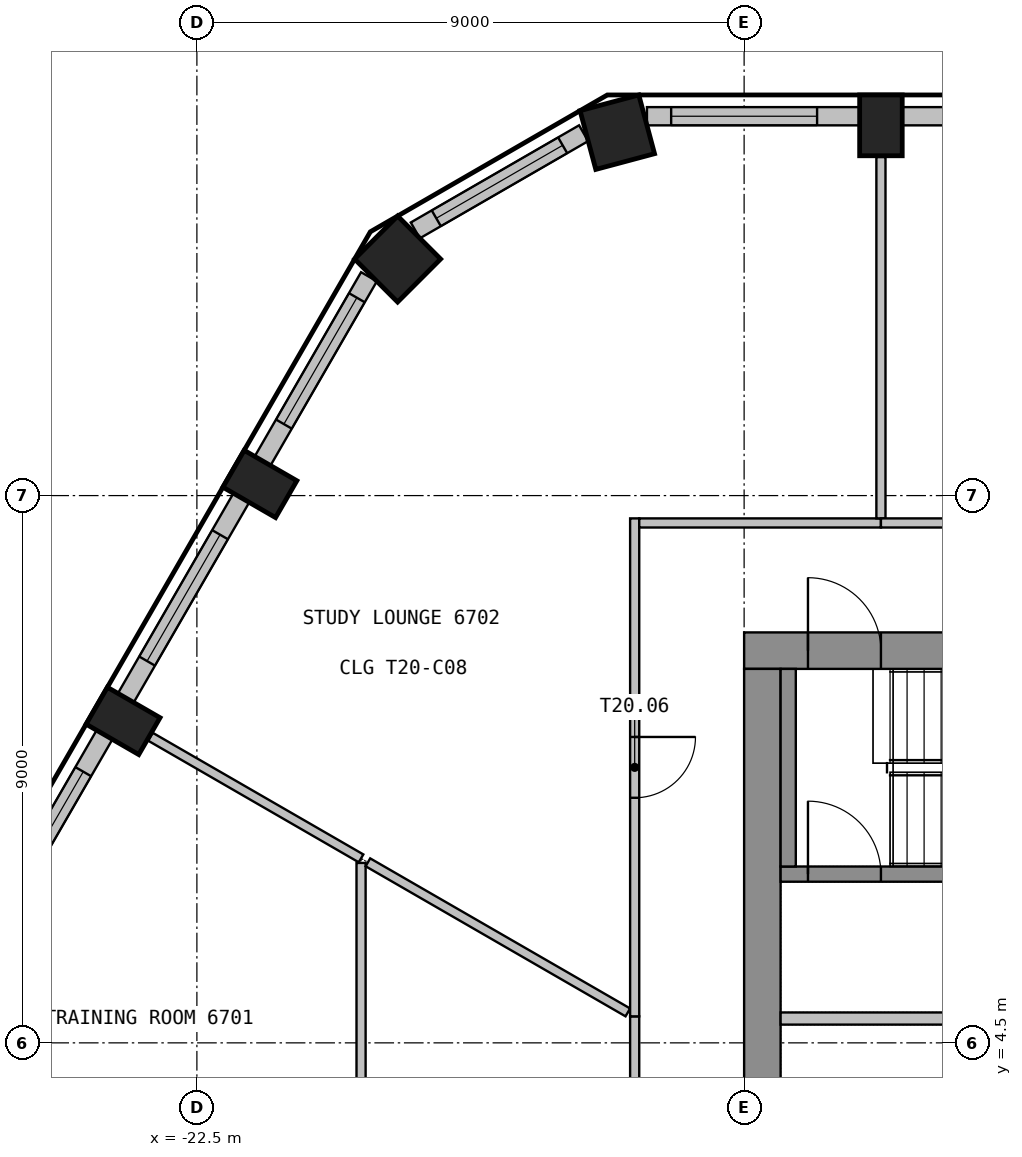
"""IFC4 building model, lengths in metres.
Left out: names, types, materials, properties, quantities, classifications, styles, units other than length and angle.
Written with IfcOpenShell. Run it as: python <this file> out.ifc"""

import sys

from ifc_helpers import new_model, si_unit, direction, frame, frame_2d, origin, origin_2d, place, context, subcontext, project, spatial, rectangle, extrude, element, fill, save


model = new_model("IFC4")
c1 = context("Model", 3, precision=1e-05, world=origin(), true_north=direction((0.0, 1.0)))
c2 = subcontext(c1, "Body", "Model", "MODEL_VIEW")
j1 = project(units=[si_unit("LENGTHUNIT", "METRE"), si_unit("PLANEANGLEUNIT", "RADIAN")], contexts=[c1])
p1 = place(None, origin())
s1 = spatial("IfcSite", under=j1, at=p1, CompositionType="ELEMENT")
p2 = place(p1, origin())
s2 = spatial("IfcBuilding", under=s1, at=p2, CompositionType="ELEMENT")
p3 = place(p2, frame((0.0, 0.0, 270.3)))
s3 = spatial("IfcBuildingStorey", under=s2, at=p3, CompositionType="ELEMENT", Elevation=270.3)
p4 = place(p3, frame((-11.25, 19.588, 0.0), z_axis=(0.0, 0.0, 1.0), x_axis=(-1.0, 0.0, 0.0)))
e1 = element("IfcColumn", 1, at=p4, inside=s3, PredefinedType="COLUMN", context=c2, shape_type="SweptSolid", body=[
    extrude(rectangle(XDim=0.7, YDim=1.0, at=origin_2d()), origin(), (0.0, 0.0, 1.0), 3.575),
])
for number, where, z_axis, x_axis in (
    (2, (-15.586, 19.476, 0.0), (0.0, 0.0, 1.0), (-0.966, -0.259, 0.0)),
    (3, (-19.199, 17.39, 0.0), (0.0, 0.0, 1.0), (-0.707, -0.707, 0.0)),
):
    element("IfcColumn", number, at=place(p3, frame(where, z_axis=z_axis, x_axis=x_axis)), inside=s3, PredefinedType="COLUMN", context=c2, shape_type="SweptSolid", body=[
        extrude(rectangle(XDim=1.0, YDim=1.0, at=origin_2d()), origin(), (0.0, 0.0, 1.0), 3.575),
    ])
for number, where, z_axis, x_axis in (
    (4, (-21.464, 13.691, 0.0), (0.0, 0.0, 1.0), (-0.5, -0.866, 0.0)),
    (5, (-23.714, 9.794, 0.0), (0.0, 0.0, 1.0), (-0.5, -0.866, 0.0)),
):
    element("IfcColumn", number, at=place(p3, frame(where, z_axis=z_axis, x_axis=x_axis)), inside=s3, PredefinedType="COLUMN", context=c2, shape_type="SweptSolid", body=[
        extrude(rectangle(XDim=0.7, YDim=1.0, at=origin_2d()), origin(), (0.0, 0.0, 1.0), 3.575),
    ])
p5 = place(p3, frame((-7.101, 19.739, 0.0), z_axis=(0.0, 0.0, 1.0), x_axis=(-1.0, 0.0, 0.0)))
e6 = element("IfcWall", 6, at=p5, inside=s3, PredefinedType="SOLIDWALL", context=c2, shape_type="SweptSolid", body=[
    extrude(rectangle(XDim=3.799, YDim=0.3, at=frame_2d((1.899, 0.0))), origin(), (0.0, 0.0, 1.0), 3.575),
])
p6 = place(p5, frame((0.699, 0.0, 0.9)))
e7 = element("IfcOpeningElement", 7, at=p6, cuts=e6, PredefinedType="OPENING", context=c2, shape_type="SweptSolid", body=[
    extrude(rectangle(XDim=2.4, YDim=2.1, at=frame_2d((1.2, 1.05))), frame((0.0, 0.16, 0.0), z_axis=(0.0, -1.0, 0.0), x_axis=(1.0, 0.0, 0.0)), (0.0, 0.0, 1.0), 0.32),
])
p7 = place(p3, frame((-11.601, 19.739, 0.0), z_axis=(0.0, 0.0, 1.0), x_axis=(-1.0, 0.0, 0.0)))
e8 = element("IfcWall", 8, at=p7, inside=s3, PredefinedType="SOLIDWALL", context=c2, shape_type="SweptSolid", body=[
    extrude(rectangle(XDim=3.498, YDim=0.3, at=frame_2d((1.749, 0.0))), origin(), (0.0, 0.0, 1.0), 3.575),
])
p8 = place(p7, frame((0.699, 0.0, 0.9)))
e9 = element("IfcOpeningElement", 9, at=p8, cuts=e8, PredefinedType="OPENING", context=c2, shape_type="SweptSolid", body=[
    extrude(rectangle(XDim=2.4, YDim=2.1, at=frame_2d((1.2, 1.05))), frame((0.0, 0.16, 0.0), z_axis=(0.0, -1.0, 0.0), x_axis=(1.0, 0.0, 0.0)), (0.0, 0.0, 1.0), 0.32),
])
p9 = place(p3, frame((-16.14, 19.459, 0.0), z_axis=(0.0, 0.0, 1.0), x_axis=(-0.866025316205, -0.500000151692, 0.0)))
e10 = element("IfcWall", 10, at=p9, inside=s3, PredefinedType="SOLIDWALL", context=c2, shape_type="SweptSolid", body=[
    extrude(rectangle(XDim=3.196, YDim=0.3, at=frame_2d((1.598, 0.0))), origin(), (0.0, 0.0, 1.0), 3.575),
])
p10 = place(p9, frame((0.398, 0.0, 0.9)))
e11 = element("IfcOpeningElement", 11, at=p10, cuts=e10, PredefinedType="OPENING", context=c2, shape_type="SweptSolid", body=[
    extrude(rectangle(XDim=2.4, YDim=2.1, at=frame_2d((1.2, 1.05))), frame((0.0, 0.16, 0.0), z_axis=(0.0, -1.0, 0.0), x_axis=(1.0, 0.0, 0.0)), (0.0, 0.0, 1.0), 0.32),
])
p11 = place(p3, frame((-19.67, 17.099, 0.0), z_axis=(0.0, 0.0, 1.0), x_axis=(-0.499960102815, -0.866048437209, 0.0)))
e12 = element("IfcWall", 12, at=p11, inside=s3, PredefinedType="SOLIDWALL", context=c2, shape_type="SweptSolid", body=[
    extrude(rectangle(XDim=3.498, YDim=0.3, at=frame_2d((1.749, 0.0))), origin(), (0.0, 0.0, 1.0), 3.575),
])
p12 = place(p11, frame((0.398, 0.0, 0.9)))
e13 = element("IfcOpeningElement", 13, at=p12, cuts=e12, PredefinedType="OPENING", context=c2, shape_type="SweptSolid", body=[
    extrude(rectangle(XDim=2.4, YDim=2.1, at=frame_2d((1.2, 1.05))), frame((0.0, 0.16, 0.0), z_axis=(0.0, -1.0, 0.0), x_axis=(1.0, 0.0, 0.0)), (0.0, 0.0, 1.0), 0.32),
])
p13 = place(p3, frame((-21.769, 13.463, 0.0), z_axis=(0.0, 0.0, 1.0), x_axis=(-0.499982058975, -0.866035761792, 0.0)))
e14 = element("IfcWall", 14, at=p13, inside=s3, PredefinedType="SOLIDWALL", context=c2, shape_type="SweptSolid", body=[
    extrude(rectangle(XDim=3.799, YDim=0.3, at=frame_2d((1.899, 0.0))), origin(), (0.0, 0.0, 1.0), 3.575),
])
p14 = place(p13, frame((0.699, 0.0, 0.9)))
e15 = element("IfcOpeningElement", 15, at=p14, cuts=e14, PredefinedType="OPENING", context=c2, shape_type="SweptSolid", body=[
    extrude(rectangle(XDim=2.4, YDim=2.1, at=frame_2d((1.2, 1.05))), frame((0.0, 0.16, 0.0), z_axis=(0.0, -1.0, 0.0), x_axis=(1.0, 0.0, 0.0)), (0.0, 0.0, 1.0), 0.32),
])
p15 = place(p3, frame((-24.019, 9.566, 0.0), z_axis=(0.0, 0.0, 1.0), x_axis=(-0.499982058975, -0.866035761792, 0.0)))
e16 = element("IfcWall", 16, at=p15, inside=s3, PredefinedType="SOLIDWALL", context=c2, shape_type="SweptSolid", body=[
    extrude(rectangle(XDim=3.799, YDim=0.3, at=frame_2d((1.899, 0.0))), origin(), (0.0, 0.0, 1.0), 3.575),
])
p16 = place(p15, frame((0.699, 0.0, 0.9)))
e17 = element("IfcOpeningElement", 17, at=p16, cuts=e16, PredefinedType="OPENING", context=c2, shape_type="SweptSolid", body=[
    extrude(rectangle(XDim=2.4, YDim=2.1, at=frame_2d((1.2, 1.05))), frame((0.0, 0.16, 0.0), z_axis=(0.0, -1.0, 0.0), x_axis=(1.0, 0.0, 0.0)), (0.0, 0.0, 1.0), 0.32),
])
p17 = place(p3, frame((-13.5, 10.95, 0.0), z_axis=(0.0, 0.0, 1.0), x_axis=(1.0, 0.0, 0.0)))
e18 = element("IfcWall", 18, at=p17, inside=s3, PredefinedType="SHEAR", context=c2, shape_type="SweptSolid", body=[
    extrude(rectangle(XDim=27.0, YDim=0.6, at=frame_2d((13.5, 0.0))), origin(), (0.0, 0.0, 1.0), 3.575),
])
p18 = place(p17, frame((12.3, 0.0, 0.0)))
e19 = element("IfcOpeningElement", 19, at=p18, cuts=e18, PredefinedType="OPENING", context=c2, shape_type="SweptSolid", body=[
    extrude(rectangle(XDim=2.4, YDim=2.1, at=frame_2d((1.2, 1.05))), frame((0.0, 0.31, 0.0), z_axis=(0.0, -1.0, 0.0), x_axis=(1.0, 0.0, 0.0)), (0.0, 0.0, 1.0), 0.62),
])
p19 = place(p17, frame((1.05, 0.0, 0.0)))
e20 = element("IfcOpeningElement", 20, at=p19, cuts=e18, PredefinedType="OPENING", context=c2, shape_type="SweptSolid", body=[
    extrude(rectangle(XDim=1.2, YDim=2.1, at=frame_2d((0.6, 1.05))), frame((0.0, 0.31, 0.0), z_axis=(0.0, -1.0, 0.0), x_axis=(1.0, 0.0, 0.0)), (0.0, 0.0, 1.0), 0.62),
])
p20 = place(p17, frame((24.75, 0.0, 0.0)))
e21 = element("IfcOpeningElement", 21, at=p20, cuts=e18, PredefinedType="OPENING", context=c2, shape_type="SweptSolid", body=[
    extrude(rectangle(XDim=1.2, YDim=2.1, at=frame_2d((0.6, 1.05))), frame((0.0, 0.31, 0.0), z_axis=(0.0, -1.0, 0.0), x_axis=(1.0, 0.0, 0.0)), (0.0, 0.0, 1.0), 0.62),
])
p21 = place(p3, frame((-13.2, -10.65, 0.0), z_axis=(0.0, 0.0, 1.0), x_axis=(0.0, 1.0, 0.0)))
e22 = element("IfcWall", 22, at=p21, inside=s3, PredefinedType="SHEAR", context=c2, shape_type="SweptSolid", body=[
    extrude(rectangle(XDim=21.3, YDim=0.6, at=frame_2d((10.65, 0.0))), origin(), (0.0, 0.0, 1.0), 3.575),
])
p22 = place(p21, frame((9.45, 0.0, 0.0)))
e23 = element("IfcOpeningElement", 23, at=p22, cuts=e22, PredefinedType="OPENING", context=c2, shape_type="SweptSolid", body=[
    extrude(rectangle(XDim=2.4, YDim=2.1, at=frame_2d((1.2, 1.05))), frame((0.0, 0.31, 0.0), z_axis=(0.0, -1.0, 0.0), x_axis=(1.0, 0.0, 0.0)), (0.0, 0.0, 1.0), 0.62),
])
p23 = place(p3, frame((-12.9, 7.275, 0.0), z_axis=(0.0, 0.0, 1.0), x_axis=(1.0, 0.0, 0.0)))
e24 = element("IfcWall", 24, at=p23, inside=s3, PredefinedType="SHEAR", context=c2, shape_type="SweptSolid", body=[
    extrude(rectangle(XDim=10.1, YDim=0.25, at=frame_2d((5.05, 0.0))), origin(), (0.0, 0.0, 1.0), 3.575),
])
p24 = place(p23, frame((0.45, 0.0, 0.0)))
e25 = element("IfcOpeningElement", 25, at=p24, cuts=e24, PredefinedType="OPENING", context=c2, shape_type="SweptSolid", body=[
    extrude(rectangle(XDim=1.2, YDim=2.1, at=frame_2d((0.6, 1.05))), frame((0.0, 0.135, 0.0), z_axis=(0.0, -1.0, 0.0), x_axis=(1.0, 0.0, 0.0)), (0.0, 0.0, 1.0), 0.27),
])
p25 = place(p3, frame((-12.775, 7.4, 0.0), z_axis=(0.0, 0.0, 1.0), x_axis=(0.0, 1.0, 0.0)))
e26 = element("IfcWall", 26, at=p25, inside=s3, PredefinedType="SHEAR", context=c2, shape_type="SweptSolid", body=[
    extrude(rectangle(XDim=3.25, YDim=0.25, at=frame_2d((1.625, 0.0))), origin(), (0.0, 0.0, 1.0), 3.575),
])
p26 = place(p3, frame((-12.9, 4.9, 0.0), z_axis=(0.0, 0.0, 1.0), x_axis=(1.0, 0.0, 0.0)))
e27 = element("IfcWall", 27, at=p26, inside=s3, PredefinedType="PARTITIONING", context=c2, shape_type="SweptSolid", body=[
    extrude(rectangle(XDim=11.375, YDim=0.2, at=frame_2d((5.688, 0.0))), origin(), (0.0, 0.0, 1.0), 3.575),
])
p27 = place(p3, frame((-23.264, 9.534, 0.0), z_axis=(0.0, 0.0, 1.0), x_axis=(0.865984319305, -0.500071153655, 0.0)))
e28 = element("IfcWall", 28, at=p27, inside=s3, PredefinedType="PARTITIONING", context=c2, shape_type="SweptSolid", body=[
    extrude(rectangle(XDim=4.0, YDim=0.15, at=frame_2d((2.0, 0.0))), origin(), (0.0, 0.0, 1.0), 3.575),
])
p28 = place(p3, frame((-19.8, 7.459, 0.0), z_axis=(0.0, 0.0, 1.0), x_axis=(0.0, -1.0, 0.0)))
e29 = element("IfcWall", 29, at=p28, inside=s3, PredefinedType="PARTITIONING", context=c2, shape_type="SweptSolid", body=[
    extrude(rectangle(XDim=5.134, YDim=0.15, at=frame_2d((2.567, 0.0))), origin(), (0.0, 0.0, 1.0), 3.575),
])
p29 = place(p3, frame((-19.688, 7.469, 0.0), z_axis=(0.0, 0.0, 1.0), x_axis=(0.866034039096, -0.499985042903, 0.0)))
e30 = element("IfcWall", 30, at=p29, inside=s3, PredefinedType="PARTITIONING", context=c2, shape_type="SweptSolid", body=[
    extrude(rectangle(XDim=4.936, YDim=0.15, at=frame_2d((2.468, 0.0))), origin(), (0.0, 0.0, 1.0), 3.575),
])
p30 = place(p3, frame((-15.3, 4.936, 0.0), z_axis=(0.0, 0.0, 1.0), x_axis=(0.0, -1.0, 0.0)))
e31 = element("IfcWall", 31, at=p30, inside=s3, PredefinedType="PARTITIONING", context=c2, shape_type="SweptSolid", body=[
    extrude(rectangle(XDim=2.611, YDim=0.15, at=frame_2d((1.306, 0.0))), origin(), (0.0, 0.0, 1.0), 3.575),
])
p31 = place(p3, frame((-15.3, 13.125, 0.0), z_axis=(0.0, 0.0, 1.0), x_axis=(0.0, -1.0, 0.0)))
e32 = element("IfcWall", 32, at=p31, inside=s3, PredefinedType="PARTITIONING", context=c2, shape_type="SweptSolid", body=[
    extrude(rectangle(XDim=8.189, YDim=0.15, at=frame_2d((4.094, 0.0))), origin(), (0.0, 0.0, 1.0), 3.575),
])
p32 = place(p31, frame((3.594, 0.0, 0.0)))
e33 = element("IfcOpeningElement", 33, at=p32, cuts=e32, PredefinedType="OPENING", context=c2, shape_type="SweptSolid", body=[
    extrude(rectangle(XDim=1.0, YDim=2.1, at=frame_2d((0.5, 1.05))), frame((0.0, 0.085, 0.0), z_axis=(0.0, -1.0, 0.0), x_axis=(1.0, 0.0, 0.0)), (0.0, 0.0, 1.0), 0.17),
])
p33 = place(p3, frame((-11.25, 13.05, 0.0), z_axis=(0.0, 0.0, 1.0), x_axis=(-1.0, 0.0, 0.0)))
e34 = element("IfcWall", 34, at=p33, inside=s3, PredefinedType="PARTITIONING", context=c2, shape_type="SweptSolid", body=[
    extrude(rectangle(XDim=3.975, YDim=0.15, at=frame_2d((1.988, 0.0))), origin(), (0.0, 0.0, 1.0), 3.575),
])
p34 = place(p3, frame((-11.25, 19.069, 0.0), z_axis=(0.0, 0.0, 1.0), x_axis=(0.0, -1.0, 0.0)))
e35 = element("IfcWall", 35, at=p34, inside=s3, PredefinedType="PARTITIONING", context=c2, shape_type="SweptSolid", body=[
    extrude(rectangle(XDim=5.944, YDim=0.15, at=frame_2d((2.972, 0.0))), origin(), (0.0, 0.0, 1.0), 3.575),
])
p35 = place(p3, frame((6.75, 13.05, 0.0), z_axis=(0.0, 0.0, 1.0), x_axis=(-1.0, 0.0, 0.0)))
e36 = element("IfcWall", 36, at=p35, inside=s3, PredefinedType="PARTITIONING", context=c2, shape_type="SweptSolid", body=[
    extrude(rectangle(XDim=18.0, YDim=0.15, at=frame_2d((9.0, 0.0))), origin(), (0.0, 0.0, 1.0), 3.575),
])
p36 = place(p35, frame((8.5, 0.0, 0.0)))
e37 = element("IfcOpeningElement", 37, at=p36, cuts=e36, PredefinedType="OPENING", context=c2, shape_type="SweptSolid", body=[
    extrude(rectangle(XDim=1.0, YDim=2.1, at=frame_2d((0.5, 1.05))), frame((0.0, 0.085, 0.0), z_axis=(0.0, -1.0, 0.0), x_axis=(1.0, 0.0, 0.0)), (0.0, 0.0, 1.0), 0.17),
])
p37 = place(p8, origin())
e38 = element("IfcWindow", 38, at=p37, inside=s3, PartitioningType="SINGLE_PANEL", PredefinedType="WINDOW", context=c2, shape_type="SweptSolid", body=[
    extrude(rectangle(XDim=2.4, YDim=2.1, at=frame_2d((1.2, 1.05))), frame((0.0, 0.03, 0.0), z_axis=(0.0, -1.0, 0.0), x_axis=(1.0, 0.0, 0.0)), (0.0, 0.0, 1.0), 0.06),
])
fill(e9, e38)
p38 = place(p10, origin())
e39 = element("IfcWindow", 39, at=p38, inside=s3, PartitioningType="SINGLE_PANEL", PredefinedType="WINDOW", context=c2, shape_type="SweptSolid", body=[
    extrude(rectangle(XDim=2.4, YDim=2.1, at=frame_2d((1.2, 1.05))), frame((0.0, 0.03, 0.0), z_axis=(0.0, -1.0, 0.0), x_axis=(1.0, 0.0, 0.0)), (0.0, 0.0, 1.0), 0.06),
])
fill(e11, e39)
p39 = place(p12, origin())
e40 = element("IfcWindow", 40, at=p39, inside=s3, PartitioningType="SINGLE_PANEL", PredefinedType="WINDOW", context=c2, shape_type="SweptSolid", body=[
    extrude(rectangle(XDim=2.4, YDim=2.1, at=frame_2d((1.2, 1.05))), frame((0.0, 0.03, 0.0), z_axis=(0.0, -1.0, 0.0), x_axis=(1.0, 0.0, 0.0)), (0.0, 0.0, 1.0), 0.06),
])
fill(e13, e40)
p40 = place(p14, origin())
e41 = element("IfcWindow", 41, at=p40, inside=s3, PartitioningType="SINGLE_PANEL", PredefinedType="WINDOW", context=c2, shape_type="SweptSolid", body=[
    extrude(rectangle(XDim=2.4, YDim=2.1, at=frame_2d((1.2, 1.05))), frame((0.0, 0.03, 0.0), z_axis=(0.0, -1.0, 0.0), x_axis=(1.0, 0.0, 0.0)), (0.0, 0.0, 1.0), 0.06),
])
fill(e15, e41)
p41 = place(p16, origin())
e42 = element("IfcWindow", 42, at=p41, inside=s3, PartitioningType="SINGLE_PANEL", PredefinedType="WINDOW", context=c2, shape_type="SweptSolid", body=[
    extrude(rectangle(XDim=2.4, YDim=2.1, at=frame_2d((1.2, 1.05))), frame((0.0, 0.03, 0.0), z_axis=(0.0, -1.0, 0.0), x_axis=(1.0, 0.0, 0.0)), (0.0, 0.0, 1.0), 0.06),
])
fill(e17, e42)
p42 = place(p19, origin())
e43 = element("IfcDoor", 43, at=p42, inside=s3, OperationType="SINGLE_SWING_RIGHT", PredefinedType="DOOR", context=c2, shape_type="SweptSolid", body=[
    extrude(rectangle(XDim=1.2, YDim=2.1, at=frame_2d((0.6, 1.05))), frame((0.0, 0.025, 0.0), z_axis=(0.0, -1.0, 0.0), x_axis=(1.0, 0.0, 0.0)), (0.0, 0.0, 1.0), 0.05),
])
fill(e20, e43)
p43 = place(p24, origin())
e44 = element("IfcDoor", 44, at=p43, inside=s3, OperationType="SINGLE_SWING_LEFT", PredefinedType="DOOR", context=c2, shape_type="SweptSolid", body=[
    extrude(rectangle(XDim=1.2, YDim=2.1, at=frame_2d((0.6, 1.05))), frame((0.0, 0.025, 0.0), z_axis=(0.0, -1.0, 0.0), x_axis=(1.0, 0.0, 0.0)), (0.0, 0.0, 1.0), 0.05),
])
fill(e25, e44)
p44 = place(p32, origin())
e45 = element("IfcDoor", 45, at=p44, inside=s3, OperationType="SINGLE_SWING_RIGHT", PredefinedType="DOOR", context=c2, shape_type="SweptSolid", body=[
    extrude(rectangle(XDim=1.0, YDim=2.1, at=frame_2d((0.5, 1.05))), frame((0.0, 0.025, 0.0), z_axis=(0.0, -1.0, 0.0), x_axis=(1.0, 0.0, 0.0)), (0.0, 0.0, 1.0), 0.05),
])
fill(e33, e45)
save(model, sys.argv[1])
